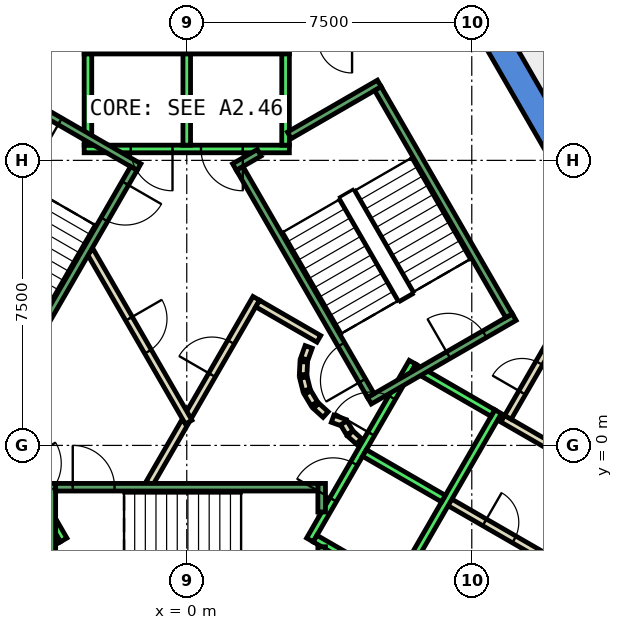
"""IFC4 building model, lengths in metres.
Left out: names, types, materials, properties, quantities, classifications, styles, units other than length and angle.
Written with IfcOpenShell. Run it as: python <this file> out.ifc"""

import sys

from ifc_helpers import new_model, si_unit, direction, frame, frame_2d, origin, place, context, subcontext, project, spatial, polyline, rectangle, outline, extrude, element, fill, save


model = new_model("IFC4")
c1 = context("Model", 3, precision=1e-05, world=origin(), true_north=direction((0.0, 1.0)))
c2 = subcontext(c1, "Body", "Model", "MODEL_VIEW")
j1 = project(units=[si_unit("LENGTHUNIT", "METRE"), si_unit("PLANEANGLEUNIT", "RADIAN")], contexts=[c1])
p1 = place(None, origin())
s1 = spatial("IfcSite", under=j1, at=p1, CompositionType="ELEMENT")
p2 = place(p1, origin())
s2 = spatial("IfcBuilding", under=s1, at=p2, CompositionType="ELEMENT")
p3 = place(p2, frame((0.0, 0.0, 223.4)))
s3 = spatial("IfcBuildingStorey", under=s2, at=p3, CompositionType="ELEMENT", Elevation=223.4)
p4 = place(p3, frame((0.0, 0.0, -0.4)))
e1 = element("IfcWall", 1, at=p4, inside=s3, PredefinedType="SHEAR", context=c2, shape_type="SweptSolid", body=[
    extrude(outline(polyline([(8.084, 11.498), (7.478, 11.148), (12.471, 2.5), (13.279, 2.5), (8.084, 11.498)])), origin(), (0.0, 0.0, 1.0), 4.2),
])
p5 = place(p3, frame((0.0, 0.0, -0.4)))
e2 = element("IfcWall", 2, at=p5, inside=s3, PredefinedType="SHEAR", context=c2, shape_type="SweptSolid", body=[
    extrude(outline(polyline([(6.64, -9.0), (13.279, 2.5), (12.471, 2.5), (6.235, -8.3), (6.64, -9.0)])), origin(), (0.0, 0.0, 1.0), 4.2),
])
p6 = place(p3, frame((6.841, -1.451, 0.0), z_axis=(0.0, 0.0, 1.0), x_axis=(0.866220623736, -0.499661716578, 0.0)))
e3 = element("IfcWall", 3, at=p6, inside=s3, PredefinedType="PARTITIONING", context=c2, shape_type="SweptSolid", body=[
    extrude(rectangle(XDim=2.9, YDim=0.2, at=frame_2d((1.45, 0.0))), origin(), (0.0, 0.0, 1.0), 3.8),
])
p7 = place(p6, frame((1.15, 0.0, 0.0)))
e4 = element("IfcOpeningElement", 4, at=p7, cuts=e3, PredefinedType="OPENING", context=c2, shape_type="SweptSolid", body=[
    extrude(rectangle(XDim=0.9, YDim=2.1, at=frame_2d((0.45, 1.05))), frame((0.0, 0.11, 0.0), z_axis=(0.0, -1.0, 0.0), x_axis=(1.0, 0.0, 0.0)), (0.0, 0.0, 1.0), 0.22),
])
p8 = place(p3, frame((10.653, -0.648, 0.0), z_axis=(0.0, 0.0, 1.0), x_axis=(-0.866036505625, 0.499980770555, 0.0)))
e5 = element("IfcWall", 5, at=p8, inside=s3, PredefinedType="PARTITIONING", context=c2, shape_type="SweptSolid", body=[
    extrude(rectangle(XDim=2.7, YDim=0.2, at=frame_2d((1.35, 0.0))), origin(), (0.0, 0.0, 1.0), 3.8),
])
p9 = place(p3, frame((8.451, 0.738, 0.0), z_axis=(0.0, 0.0, 1.0), x_axis=(0.499913221443, 0.866075499611, 0.0)))
e6 = element("IfcWall", 6, at=p9, inside=s3, PredefinedType="PARTITIONING", context=c2, shape_type="SweptSolid", body=[
    extrude(rectangle(XDim=2.4, YDim=0.2, at=frame_2d((1.2, 0.0))), origin(), (0.0, 0.0, 1.0), 3.8),
])
p10 = place(p9, frame((0.75, 0.0, 0.0)))
e7 = element("IfcOpeningElement", 7, at=p10, cuts=e6, PredefinedType="OPENING", context=c2, shape_type="SweptSolid", body=[
    extrude(rectangle(XDim=0.9, YDim=2.1, at=frame_2d((0.45, 1.05))), frame((0.0, 0.11, 0.0), z_axis=(0.0, -1.0, 0.0), x_axis=(1.0, 0.0, 0.0)), (0.0, 0.0, 1.0), 0.22),
])
p11 = place(p3, frame((-0.982, -1.0, 0.0), z_axis=(0.0, 0.0, 1.0), x_axis=(0.50024047865, 0.865886518847, 0.0)))
e8 = element("IfcWall", 8, at=p11, inside=s3, PredefinedType="PARTITIONING", context=c2, shape_type="SweptSolid", body=[
    extrude(rectangle(XDim=1.863, YDim=0.2, at=frame_2d((0.931, 0.0))), origin(), (0.0, 0.0, 1.0), 3.8),
])
p12 = place(p3, frame((0.05, 0.787, 0.0), z_axis=(0.0, 0.0, 1.0), x_axis=(0.499954076797, 0.866051915934, 0.0)))
e9 = element("IfcWall", 9, at=p12, inside=s3, PredefinedType="PARTITIONING", context=c2, shape_type="SweptSolid", body=[
    extrude(rectangle(XDim=3.558, YDim=0.2, at=frame_2d((1.779, 0.0))), origin(), (0.0, 0.0, 1.0), 3.8),
])
p13 = place(p12, frame((1.229, 0.0, 0.0)))
e10 = element("IfcOpeningElement", 10, at=p13, cuts=e9, PredefinedType="OPENING", context=c2, shape_type="SweptSolid", body=[
    extrude(rectangle(XDim=1.0, YDim=2.1, at=frame_2d((0.5, 1.05))), frame((0.0, 0.11, 0.0), z_axis=(0.0, -1.0, 0.0), x_axis=(1.0, 0.0, 0.0)), (0.0, 0.0, 1.0), 0.22),
])
p14 = place(p3, frame((1.866, 3.732, 0.0), z_axis=(0.0, 0.0, 1.0), x_axis=(0.866043361281, -0.499968895414, 0.0)))
e11 = element("IfcWall", 11, at=p14, inside=s3, PredefinedType="PARTITIONING", context=c2, shape_type="SweptSolid", body=[
    extrude(rectangle(XDim=1.858, YDim=0.2, at=frame_2d((0.929, 0.0))), origin(), (0.0, 0.0, 1.0), 3.8),
])
p15 = place(p3, frame((3.208, 2.592, 0.0), z_axis=(0.0, 0.0, 1.0), x_axis=(-0.337388820924, -0.941365382578, 0.0)))
e12 = element("IfcWall", 12, at=p15, inside=s3, PredefinedType="PARTITIONING", context=c2, shape_type="SweptSolid", body=[
    extrude(rectangle(XDim=0.338, YDim=0.2, at=frame_2d((0.169, 0.0))), origin(), (0.0, 0.0, 1.0), 3.8),
])
p16 = place(p3, frame((3.079, 2.199, 0.0), z_axis=(0.0, 0.0, 1.0), x_axis=(-0.047771483479, -0.998858290933, 0.0)))
e13 = element("IfcWall", 13, at=p16, inside=s3, PredefinedType="PARTITIONING", context=c2, shape_type="SweptSolid", body=[
    extrude(rectangle(XDim=0.337, YDim=0.2, at=frame_2d((0.169, 0.0))), origin(), (0.0, 0.0, 1.0), 3.8),
])
p17 = place(p3, frame((3.07, 1.786, 0.0), z_axis=(0.0, 0.0, 1.0), x_axis=(0.242705583207, -0.970099994784, 0.0)))
e14 = element("IfcWall", 14, at=p17, inside=s3, PredefinedType="PARTITIONING", context=c2, shape_type="SweptSolid", body=[
    extrude(rectangle(XDim=0.338, YDim=0.2, at=frame_2d((0.169, 0.0))), origin(), (0.0, 0.0, 1.0), 3.8),
])
for number, where, z_axis, x_axis in (
    (15, (3.182, 1.388, 0.0), (0.0, 0.0, 1.0), (0.512, -0.859, 0.0)),
    (16, (3.404, 1.039, 0.0), (0.0, 0.0, 1.0), (0.74, -0.672, 0.0)),
):
    element("IfcWall", number, at=place(p3, frame(where, z_axis=z_axis, x_axis=x_axis)), inside=s3, PredefinedType="PARTITIONING", context=c2, shape_type="SweptSolid", body=[
        extrude(rectangle(XDim=0.338, YDim=0.2, at=frame_2d((0.169, 0.0))), origin(), (0.0, 0.0, 1.0), 3.8),
    ])
p18 = place(p3, frame((3.838, 0.702, 0.0), z_axis=(0.0, 0.0, 1.0), x_axis=(0.941035081519, -0.338308993895, 0.0)))
e17 = element("IfcWall", 17, at=p18, inside=s3, PredefinedType="PARTITIONING", context=c2, shape_type="SweptSolid", body=[
    extrude(rectangle(XDim=0.337, YDim=0.2, at=frame_2d((0.168, 0.0))), origin(), (0.0, 0.0, 1.0), 3.8),
])
p19 = place(p3, frame((4.132, 0.593, 0.0), z_axis=(0.0, 0.0, 1.0), x_axis=(0.513561617048, -0.858052717201, 0.0)))
e18 = element("IfcWall", 18, at=p19, inside=s3, PredefinedType="PARTITIONING", context=c2, shape_type="SweptSolid", body=[
    extrude(rectangle(XDim=0.308, YDim=0.2, at=frame_2d((0.154, 0.0))), origin(), (0.0, 0.0, 1.0), 3.8),
])
p20 = place(p3, frame((4.301, 0.315, 0.0), z_axis=(0.0, 0.0, 1.0), x_axis=(0.741798017506, -0.670623367639, 0.0)))
e19 = element("IfcWall", 19, at=p20, inside=s3, PredefinedType="PARTITIONING", context=c2, shape_type="SweptSolid", body=[
    extrude(rectangle(XDim=0.309, YDim=0.2, at=frame_2d((0.154, 0.0))), origin(), (0.0, 0.0, 1.0), 3.8),
])
p21 = place(p3, frame((-2.54, 5.1, 0.0), z_axis=(0.0, 0.0, 1.0), x_axis=(0.499925051871, -0.866068670783, 0.0)))
e20 = element("IfcWall", 20, at=p21, inside=s3, PredefinedType="PARTITIONING", context=c2, shape_type="SweptSolid", body=[
    extrude(rectangle(XDim=5.181, YDim=0.2, at=frame_2d((2.59, 0.0))), origin(), (0.0, 0.0, 1.0), 3.8),
])
p22 = place(p21, frame((2.04, 0.0, 0.0)))
e21 = element("IfcOpeningElement", 21, at=p22, cuts=e20, PredefinedType="OPENING", context=c2, shape_type="SweptSolid", body=[
    extrude(rectangle(XDim=1.0, YDim=2.1, at=frame_2d((0.5, 1.05))), frame((0.0, 0.11, 0.0), z_axis=(0.0, -1.0, 0.0), x_axis=(1.0, 0.0, 0.0)), (0.0, 0.0, 1.0), 0.22),
])
p23 = place(p3, frame((2.7, 7.8, 0.0), z_axis=(0.0, 0.0, 1.0), x_axis=(-1.0, 0.0, 0.0)))
e22 = element("IfcWall", 22, at=p23, inside=s3, PredefinedType="STANDARD", context=c2, shape_type="SweptSolid", body=[
    extrude(rectangle(XDim=5.4, YDim=0.2, at=frame_2d((2.7, 0.0))), origin(), (0.0, 0.0, 1.0), 3.8),
])
p24 = place(p23, frame((1.225, 0.0, 0.0)))
e23 = element("IfcOpeningElement", 23, at=p24, cuts=e22, PredefinedType="OPENING", context=c2, shape_type="SweptSolid", body=[
    extrude(rectangle(XDim=1.1, YDim=2.1, at=frame_2d((0.55, 1.05))), frame((0.0, 0.11, 0.0), z_axis=(0.0, -1.0, 0.0), x_axis=(1.0, 0.0, 0.0)), (0.0, 0.0, 1.0), 0.22),
])
p25 = place(p23, frame((3.075, 0.0, 0.0)))
e24 = element("IfcOpeningElement", 24, at=p25, cuts=e22, PredefinedType="OPENING", context=c2, shape_type="SweptSolid", body=[
    extrude(rectangle(XDim=1.1, YDim=2.1, at=frame_2d((0.55, 1.05))), frame((0.0, 0.11, 0.0), z_axis=(0.0, -1.0, 0.0), x_axis=(1.0, 0.0, 0.0)), (0.0, 0.0, 1.0), 0.22),
])
p26 = place(p3, frame((2.7, 10.4, 0.0), z_axis=(0.0, 0.0, 1.0), x_axis=(-1.0, 0.0, 0.0)))
e25 = element("IfcWall", 25, at=p26, inside=s3, PredefinedType="STANDARD", context=c2, shape_type="SweptSolid", body=[
    extrude(rectangle(XDim=5.4, YDim=0.2, at=frame_2d((2.7, 0.0))), origin(), (0.0, 0.0, 1.0), 3.8),
])
for number, where, z_axis, x_axis in (
    (26, (2.6, 7.9, 0.0), (0.0, 0.0, 1.0), (0.0, 1.0, 0.0)),
    (27, (0.0, 7.9, 0.0), (0.0, 0.0, 1.0), (0.0, 1.0, 0.0)),
    (28, (-2.6, 7.9, 0.0), (0.0, 0.0, 1.0), (0.0, 1.0, 0.0)),
):
    element("IfcWall", number, at=place(p3, frame(where, z_axis=z_axis, x_axis=x_axis)), inside=s3, PredefinedType="STANDARD", context=c2, shape_type="SweptSolid", body=[
        extrude(rectangle(XDim=2.4, YDim=0.2, at=frame_2d((1.2, 0.0))), origin(), (0.0, 0.0, 1.0), 3.8),
    ])
p27 = place(p3, frame((-5.94, 2.188, 0.0), z_axis=(0.0, 0.0, 1.0), x_axis=(0.500034260056, -0.866005622828, 0.0)))
e29 = element("IfcWall", 29, at=p27, inside=s3, PredefinedType="STANDARD", context=c2, shape_type="SweptSolid", body=[
    extrude(rectangle(XDim=5.399, YDim=0.2, at=frame_2d((2.7, 0.0))), origin(), (0.0, 0.0, 1.0), 3.8),
])
p28 = place(p27, frame((3.075, 0.0, 0.0)))
e30 = element("IfcOpeningElement", 30, at=p28, cuts=e29, PredefinedType="OPENING", context=c2, shape_type="SweptSolid", body=[
    extrude(rectangle(XDim=1.1, YDim=2.1, at=frame_2d((0.55, 1.05))), frame((0.0, 0.11, 0.0), z_axis=(0.0, -1.0, 0.0), x_axis=(1.0, 0.0, 0.0)), (0.0, 0.0, 1.0), 0.22),
])
p29 = place(p27, frame((1.225, 0.0, 0.0)))
e31 = element("IfcOpeningElement", 31, at=p29, cuts=e29, PredefinedType="OPENING", context=c2, shape_type="SweptSolid", body=[
    extrude(rectangle(XDim=1.1, YDim=2.1, at=frame_2d((0.55, 1.05))), frame((0.0, 0.11, 0.0), z_axis=(0.0, -1.0, 0.0), x_axis=(1.0, 0.0, 0.0)), (0.0, 0.0, 1.0), 0.22),
])
p30 = place(p3, frame((-3.377, -2.452, 0.0), z_axis=(0.0, 0.0, 1.0), x_axis=(-0.865955154139, -0.50012165622, 0.0)))
e32 = element("IfcWall", 32, at=p30, inside=s3, PredefinedType="STANDARD", context=c2, shape_type="SweptSolid", body=[
    extrude(rectangle(XDim=2.4, YDim=0.2, at=frame_2d((1.2, 0.0))), origin(), (0.0, 0.0, 1.0), 3.8),
])
p31 = place(p3, frame((3.24, -2.488, 0.0), z_axis=(0.0, 0.0, 1.0), x_axis=(0.500034260056, 0.866005622828, 0.0)))
e33 = element("IfcWall", 33, at=p31, inside=s3, PredefinedType="STANDARD", context=c2, shape_type="SweptSolid", body=[
    extrude(rectangle(XDim=5.399, YDim=0.2, at=frame_2d((2.7, 0.0))), origin(), (0.0, 0.0, 1.0), 3.8),
])
p32 = place(p31, frame((3.225, 0.0, 0.0)))
e34 = element("IfcOpeningElement", 34, at=p32, cuts=e33, PredefinedType="OPENING", context=c2, shape_type="SweptSolid", body=[
    extrude(rectangle(XDim=1.1, YDim=2.1, at=frame_2d((0.55, 1.05))), frame((0.0, 0.11, 0.0), z_axis=(0.0, -1.0, 0.0), x_axis=(1.0, 0.0, 0.0)), (0.0, 0.0, 1.0), 0.22),
])
p33 = place(p31, frame((1.225, 0.0, 0.0)))
e35 = element("IfcOpeningElement", 35, at=p33, cuts=e33, PredefinedType="OPENING", context=c2, shape_type="SweptSolid", body=[
    extrude(rectangle(XDim=1.1, YDim=2.1, at=frame_2d((0.55, 1.05))), frame((0.0, 0.11, 0.0), z_axis=(0.0, -1.0, 0.0), x_axis=(1.0, 0.0, 0.0)), (0.0, 0.0, 1.0), 0.22),
])
p34 = place(p3, frame((5.492, -3.788, 0.0), z_axis=(0.0, 0.0, 1.0), x_axis=(0.500034260056, 0.866005622828, 0.0)))
e36 = element("IfcWall", 36, at=p34, inside=s3, PredefinedType="STANDARD", context=c2, shape_type="SweptSolid", body=[
    extrude(rectangle(XDim=5.399, YDim=0.2, at=frame_2d((2.7, 0.0))), origin(), (0.0, 0.0, 1.0), 3.8),
])
p35 = place(p3, frame((3.377, -2.452, 0.0), z_axis=(0.0, 0.0, 1.0), x_axis=(0.865955154139, -0.50012165622, 0.0)))
e37 = element("IfcWall", 37, at=p35, inside=s3, PredefinedType="STANDARD", context=c2, shape_type="SweptSolid", body=[
    extrude(rectangle(XDim=2.4, YDim=0.2, at=frame_2d((1.2, 0.0))), origin(), (0.0, 0.0, 1.0), 3.8),
])
for number, where, z_axis, x_axis in (
    (38, (4.677, -0.2, 0.0), (0.0, 0.0, 1.0), (0.866, -0.5, 0.0)),
    (39, (5.977, 2.052, 0.0), (0.0, 0.0, 1.0), (0.866, -0.5, 0.0)),
):
    element("IfcWall", number, at=place(p3, frame(where, z_axis=z_axis, x_axis=x_axis)), inside=s3, PredefinedType="STANDARD", context=c2, shape_type="SweptSolid", body=[
        extrude(rectangle(XDim=2.399, YDim=0.2, at=frame_2d((1.2, 0.0))), origin(), (0.0, 0.0, 1.0), 3.8),
    ])
p36 = place(p3, frame((-3.55, -1.0, 0.0), z_axis=(0.0, 0.0, 1.0), x_axis=(0.0, -1.0, 0.0)))
e40 = element("IfcWall", 40, at=p36, inside=s3, PredefinedType="STANDARD", context=c2, shape_type="SweptSolid", body=[
    extrude(rectangle(XDim=4.4, YDim=0.2, at=frame_2d((2.2, 0.0))), origin(), (0.0, 0.0, 1.0), 3.8),
])
p37 = place(p36, frame((2.4, 0.0, 0.0)))
e41 = element("IfcOpeningElement", 41, at=p37, cuts=e40, PredefinedType="OPENING", context=c2, shape_type="SweptSolid", body=[
    extrude(rectangle(XDim=1.1, YDim=2.2, at=frame_2d((0.55, 1.1))), frame((0.0, 0.11, 0.0), z_axis=(0.0, -1.0, 0.0), x_axis=(1.0, 0.0, 0.0)), (0.0, 0.0, 1.0), 0.22),
])
p38 = place(p3, frame((3.55, -2.667, 0.0), z_axis=(0.0, 0.0, 1.0), x_axis=(0.0, -1.0, 0.0)))
e42 = element("IfcWall", 42, at=p38, inside=s3, PredefinedType="STANDARD", context=c2, shape_type="SweptSolid", body=[
    extrude(rectangle(XDim=2.733, YDim=0.2, at=frame_2d((1.366, 0.0))), origin(), (0.0, 0.0, 1.0), 3.8),
])
p39 = place(p3, frame((3.55, -1.0, 0.0), z_axis=(0.0, 0.0, 1.0), x_axis=(0.0, -1.0, 0.0)))
e43 = element("IfcWall", 43, at=p39, inside=s3, PredefinedType="STANDARD", context=c2, shape_type="SweptSolid", body=[
    extrude(rectangle(XDim=0.751, YDim=0.2, at=frame_2d((0.375, 0.0))), origin(), (0.0, 0.0, 1.0), 3.8),
])
p40 = place(p3, frame((-3.45, -1.1, 0.0), z_axis=(0.0, 0.0, 1.0), x_axis=(1.0, 0.0, 0.0)))
e44 = element("IfcWall", 44, at=p40, inside=s3, PredefinedType="STANDARD", context=c2, shape_type="SweptSolid", body=[
    extrude(rectangle(XDim=6.9, YDim=0.2, at=frame_2d((3.45, 0.0))), origin(), (0.0, 0.0, 1.0), 3.8),
])
p41 = place(p40, frame((0.45, 0.0, 0.0)))
e45 = element("IfcOpeningElement", 45, at=p41, cuts=e44, PredefinedType="OPENING", context=c2, shape_type="SweptSolid", body=[
    extrude(rectangle(XDim=1.1, YDim=2.2, at=frame_2d((0.55, 1.1))), frame((0.0, 0.11, 0.0), z_axis=(0.0, -1.0, 0.0), x_axis=(1.0, 0.0, 0.0)), (0.0, 0.0, 1.0), 0.22),
])
p42 = place(p3, frame((4.806, 1.176, 0.0), z_axis=(0.0, 0.0, 1.0), x_axis=(0.866059941101, 0.499940174841, 0.0)))
e46 = element("IfcWall", 46, at=p42, inside=s3, PredefinedType="STANDARD", context=c2, shape_type="SweptSolid", body=[
    extrude(rectangle(XDim=4.4, YDim=0.2, at=frame_2d((2.2, 0.0))), origin(), (0.0, 0.0, 1.0), 3.8),
])
p43 = place(p42, frame((2.4, 0.0, 0.0)))
e47 = element("IfcOpeningElement", 47, at=p43, cuts=e46, PredefinedType="OPENING", context=c2, shape_type="SweptSolid", body=[
    extrude(rectangle(XDim=1.1, YDim=2.2, at=frame_2d((0.55, 1.1))), frame((0.0, 0.11, 0.0), z_axis=(0.0, -1.0, 0.0), x_axis=(1.0, 0.0, 0.0)), (0.0, 0.0, 1.0), 0.22),
])
p44 = place(p3, frame((2.7, 8.158, 0.0), z_axis=(0.0, 0.0, 1.0), x_axis=(0.86611865017, 0.499838457731, 0.0)))
e48 = element("IfcWall", 48, at=p44, inside=s3, PredefinedType="STANDARD", context=c2, shape_type="SweptSolid", body=[
    extrude(rectangle(XDim=2.733, YDim=0.2, at=frame_2d((1.366, 0.0))), origin(), (0.0, 0.0, 1.0), 3.8),
])
p45 = place(p3, frame((1.256, 7.324, 0.0), z_axis=(0.0, 0.0, 1.0), x_axis=(0.865915093549, 0.500191014278, 0.0)))
e49 = element("IfcWall", 49, at=p45, inside=s3, PredefinedType="STANDARD", context=c2, shape_type="SweptSolid", body=[
    extrude(rectangle(XDim=0.752, YDim=0.2, at=frame_2d((0.376, 0.0))), origin(), (0.0, 0.0, 1.0), 3.8),
])
p46 = place(p3, frame((4.843, 1.312, 0.0), z_axis=(0.0, 0.0, 1.0), x_axis=(-0.499963383562, 0.866046543262, 0.0)))
e50 = element("IfcWall", 50, at=p46, inside=s3, PredefinedType="STANDARD", context=c2, shape_type="SweptSolid", body=[
    extrude(rectangle(XDim=6.9, YDim=0.2, at=frame_2d((3.45, 0.0))), origin(), (0.0, 0.0, 1.0), 3.8),
])
p47 = place(p46, frame((0.45, 0.0, 0.0)))
e51 = element("IfcOpeningElement", 51, at=p47, cuts=e50, PredefinedType="OPENING", context=c2, shape_type="SweptSolid", body=[
    extrude(rectangle(XDim=1.1, YDim=2.2, at=frame_2d((0.55, 1.1))), frame((0.0, 0.11, 0.0), z_axis=(0.0, -1.0, 0.0), x_axis=(1.0, 0.0, 0.0)), (0.0, 0.0, 1.0), 0.22),
])
p48 = place(p3, frame((8.48, 3.412, 0.0), z_axis=(0.0, 0.0, 1.0), x_axis=(-0.499978703459, 0.866037698999, 0.0)))
e52 = element("IfcWall", 52, at=p48, inside=s3, PredefinedType="STANDARD", context=c2, shape_type="SweptSolid", body=[
    extrude(rectangle(XDim=6.9, YDim=0.2, at=frame_2d((3.45, 0.0))), origin(), (0.0, 0.0, 1.0), 3.8),
])
p49 = place(p3, frame((-1.256, 7.324, 0.0), z_axis=(0.0, 0.0, 1.0), x_axis=(-0.866046073146, 0.499964197906, 0.0)))
e53 = element("IfcWall", 53, at=p49, inside=s3, PredefinedType="STANDARD", context=c2, shape_type="SweptSolid", body=[
    extrude(rectangle(XDim=4.4, YDim=0.2, at=frame_2d((2.2, 0.0))), origin(), (0.0, 0.0, 1.0), 3.8),
])
p50 = place(p49, frame((2.4, 0.0, 0.0)))
e54 = element("IfcOpeningElement", 54, at=p50, cuts=e53, PredefinedType="OPENING", context=c2, shape_type="SweptSolid", body=[
    extrude(rectangle(XDim=1.1, YDim=2.2, at=frame_2d((0.55, 1.1))), frame((0.0, 0.11, 0.0), z_axis=(0.0, -1.0, 0.0), x_axis=(1.0, 0.0, 0.0)), (0.0, 0.0, 1.0), 0.22),
])
p51 = place(p3, frame((-1.393, 7.288, 0.0), z_axis=(0.0, 0.0, 1.0), x_axis=(-0.499963383562, -0.866046543262, 0.0)))
e55 = element("IfcWall", 55, at=p51, inside=s3, PredefinedType="STANDARD", context=c2, shape_type="SweptSolid", body=[
    extrude(rectangle(XDim=6.9, YDim=0.2, at=frame_2d((3.45, 0.0))), origin(), (0.0, 0.0, 1.0), 3.8),
])
p52 = place(p51, frame((0.45, 0.0, 0.0)))
e56 = element("IfcOpeningElement", 56, at=p52, cuts=e55, PredefinedType="OPENING", context=c2, shape_type="SweptSolid", body=[
    extrude(rectangle(XDim=1.1, YDim=2.2, at=frame_2d((0.55, 1.1))), frame((0.0, 0.11, 0.0), z_axis=(0.0, -1.0, 0.0), x_axis=(1.0, 0.0, 0.0)), (0.0, 0.0, 1.0), 0.22),
])
p53 = place(p13, origin())
e57 = element("IfcDoor", 57, at=p53, inside=s3, OperationType="SINGLE_SWING_RIGHT", PredefinedType="DOOR", context=c2, shape_type="SweptSolid", body=[
    extrude(rectangle(XDim=1.0, YDim=2.1, at=frame_2d((0.5, 1.05))), frame((0.0, 0.025, 0.0), z_axis=(0.0, -1.0, 0.0), x_axis=(1.0, 0.0, 0.0)), (0.0, 0.0, 1.0), 0.05),
])
fill(e10, e57)
p54 = place(p22, origin())
e58 = element("IfcDoor", 58, at=p54, inside=s3, OperationType="SINGLE_SWING_RIGHT", PredefinedType="DOOR", context=c2, shape_type="SweptSolid", body=[
    extrude(rectangle(XDim=1.0, YDim=2.1, at=frame_2d((0.5, 1.05))), frame((0.0, 0.025, 0.0), z_axis=(0.0, -1.0, 0.0), x_axis=(1.0, 0.0, 0.0)), (0.0, 0.0, 1.0), 0.05),
])
fill(e21, e58)
p55 = place(p7, origin())
e59 = element("IfcDoor", 59, at=p55, inside=s3, OperationType="SINGLE_SWING_LEFT", PredefinedType="DOOR", context=c2, shape_type="SweptSolid", body=[
    extrude(rectangle(XDim=0.9, YDim=2.1, at=frame_2d((0.45, 1.05))), frame((0.0, 0.025, 0.0), z_axis=(0.0, -1.0, 0.0), x_axis=(1.0, 0.0, 0.0)), (0.0, 0.0, 1.0), 0.05),
])
fill(e4, e59)
p56 = place(p10, origin())
e60 = element("IfcDoor", 60, at=p56, inside=s3, OperationType="SINGLE_SWING_LEFT", PredefinedType="DOOR", context=c2, shape_type="SweptSolid", body=[
    extrude(rectangle(XDim=0.9, YDim=2.1, at=frame_2d((0.45, 1.05))), frame((0.0, 0.025, 0.0), z_axis=(0.0, -1.0, 0.0), x_axis=(1.0, 0.0, 0.0)), (0.0, 0.0, 1.0), 0.05),
])
fill(e7, e60)
p57 = place(p24, origin())
e61 = element("IfcDoor", 61, at=p57, inside=s3, OperationType="SLIDING_TO_LEFT", PredefinedType="DOOR", context=c2, shape_type="SweptSolid", body=[
    extrude(rectangle(XDim=1.1, YDim=2.1, at=frame_2d((0.55, 1.05))), frame((0.0, 0.025, 0.0), z_axis=(0.0, -1.0, 0.0), x_axis=(1.0, 0.0, 0.0)), (0.0, 0.0, 1.0), 0.05),
])
fill(e23, e61)
p58 = place(p25, origin())
e62 = element("IfcDoor", 62, at=p58, inside=s3, OperationType="SLIDING_TO_LEFT", PredefinedType="DOOR", context=c2, shape_type="SweptSolid", body=[
    extrude(rectangle(XDim=1.1, YDim=2.1, at=frame_2d((0.55, 1.05))), frame((0.0, 0.025, 0.0), z_axis=(0.0, -1.0, 0.0), x_axis=(1.0, 0.0, 0.0)), (0.0, 0.0, 1.0), 0.05),
])
fill(e24, e62)
p59 = place(p32, origin())
e63 = element("IfcDoor", 63, at=p59, inside=s3, OperationType="SLIDING_TO_LEFT", PredefinedType="DOOR", context=c2, shape_type="SweptSolid", body=[
    extrude(rectangle(XDim=1.1, YDim=2.1, at=frame_2d((0.55, 1.05))), frame((0.0, 0.025, 0.0), z_axis=(0.0, -1.0, 0.0), x_axis=(1.0, 0.0, 0.0)), (0.0, 0.0, 1.0), 0.05),
])
fill(e34, e63)
p60 = place(p33, origin())
e64 = element("IfcDoor", 64, at=p60, inside=s3, OperationType="SLIDING_TO_LEFT", PredefinedType="DOOR", context=c2, shape_type="SweptSolid", body=[
    extrude(rectangle(XDim=1.1, YDim=2.1, at=frame_2d((0.55, 1.05))), frame((0.0, 0.025, 0.0), z_axis=(0.0, -1.0, 0.0), x_axis=(1.0, 0.0, 0.0)), (0.0, 0.0, 1.0), 0.05),
])
fill(e35, e64)
p61 = place(p41, origin())
e65 = element("IfcDoor", 65, at=p61, inside=s3, OperationType="SINGLE_SWING_LEFT", PredefinedType="DOOR", context=c2, shape_type="SweptSolid", body=[
    extrude(rectangle(XDim=1.1, YDim=2.2, at=frame_2d((0.55, 1.1))), frame((0.0, 0.025, 0.0), z_axis=(0.0, -1.0, 0.0), x_axis=(1.0, 0.0, 0.0)), (0.0, 0.0, 1.0), 0.05),
])
fill(e45, e65)
p62 = place(p47, origin())
e66 = element("IfcDoor", 66, at=p62, inside=s3, OperationType="SINGLE_SWING_LEFT", PredefinedType="DOOR", context=c2, shape_type="SweptSolid", body=[
    extrude(rectangle(XDim=1.1, YDim=2.2, at=frame_2d((0.55, 1.1))), frame((0.0, 0.025, 0.0), z_axis=(0.0, -1.0, 0.0), x_axis=(1.0, 0.0, 0.0)), (0.0, 0.0, 1.0), 0.05),
])
fill(e51, e66)
p63 = place(p43, origin())
e67 = element("IfcDoor", 67, at=p63, inside=s3, OperationType="SINGLE_SWING_LEFT", PredefinedType="DOOR", context=c2, shape_type="SweptSolid", body=[
    extrude(rectangle(XDim=1.1, YDim=2.2, at=frame_2d((0.55, 1.1))), frame((0.0, 0.025, 0.0), z_axis=(0.0, -1.0, 0.0), x_axis=(1.0, 0.0, 0.0)), (0.0, 0.0, 1.0), 0.05),
])
fill(e47, e67)
p64 = place(p52, origin())
e68 = element("IfcDoor", 68, at=p64, inside=s3, OperationType="SINGLE_SWING_LEFT", PredefinedType="DOOR", context=c2, shape_type="SweptSolid", body=[
    extrude(rectangle(XDim=1.1, YDim=2.2, at=frame_2d((0.55, 1.1))), frame((0.0, 0.025, 0.0), z_axis=(0.0, -1.0, 0.0), x_axis=(1.0, 0.0, 0.0)), (0.0, 0.0, 1.0), 0.05),
])
fill(e56, e68)
p65 = place(p50, origin())
e69 = element("IfcDoor", 69, at=p65, inside=s3, OperationType="SINGLE_SWING_LEFT", PredefinedType="DOOR", context=c2, shape_type="SweptSolid", body=[
    extrude(rectangle(XDim=1.1, YDim=2.2, at=frame_2d((0.55, 1.1))), frame((0.0, 0.025, 0.0), z_axis=(0.0, -1.0, 0.0), x_axis=(1.0, 0.0, 0.0)), (0.0, 0.0, 1.0), 0.05),
])
fill(e54, e69)
save(model, sys.argv[1])
